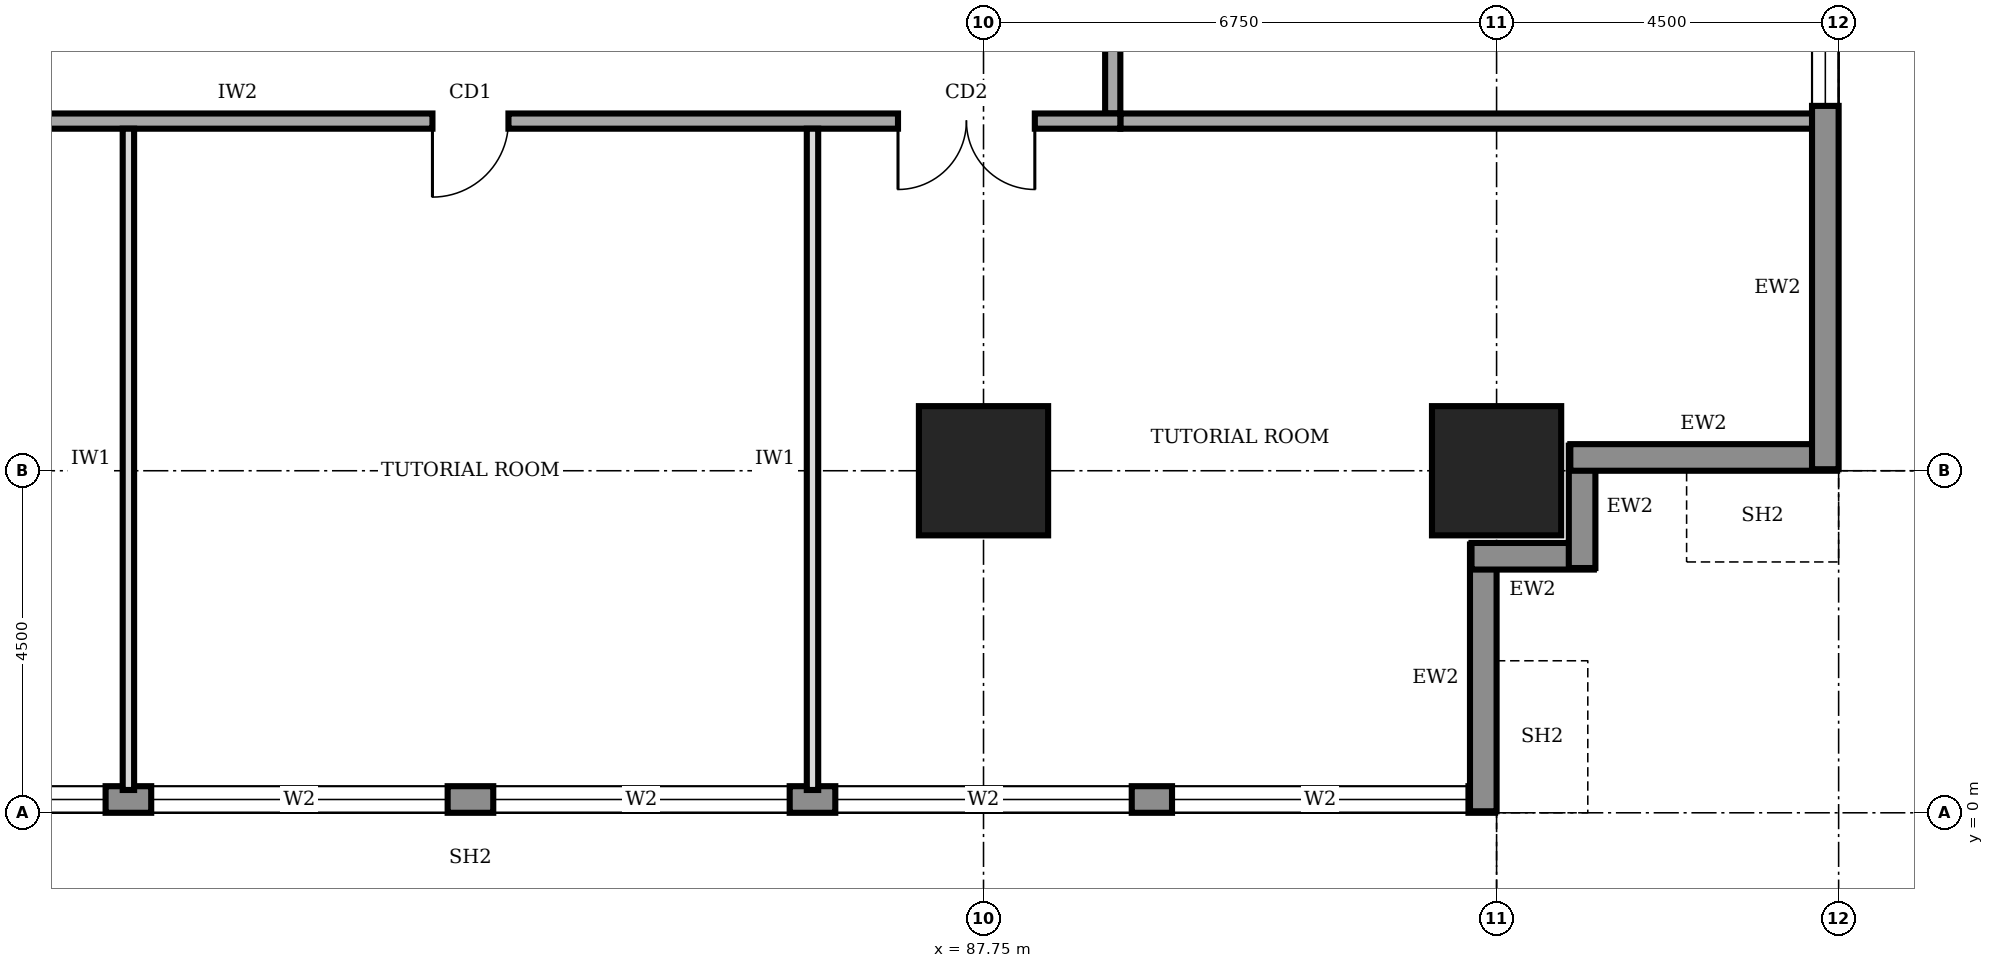
"""IFC4 building model, lengths in metres.
Left out: names, types, materials, properties, quantities, classifications, styles, units other than length and angle.
Written with IfcOpenShell. Run it as: python <this file> out.ifc"""

import sys

from ifc_helpers import new_model, si_unit, direction, frame, frame_2d, origin, origin_2d, place, context, subcontext, project, spatial, rectangle, extrude, element, fill, save


model = new_model("IFC4")
c1 = context("Model", 3, precision=1e-05, world=origin(), true_north=direction((0.0, 1.0)))
c2 = subcontext(c1, "Body", "Model", "MODEL_VIEW")
j1 = project(units=[si_unit("LENGTHUNIT", "METRE"), si_unit("PLANEANGLEUNIT", "RADIAN")], contexts=[c1])
p1 = place(None, origin())
s1 = spatial("IfcSite", under=j1, at=p1, CompositionType="ELEMENT")
p2 = place(p1, origin())
s2 = spatial("IfcBuilding", under=s1, at=p2, CompositionType="ELEMENT")
p3 = place(p2, frame((0.0, 0.0, 73.0)))
s3 = spatial("IfcBuildingStorey", under=s2, at=p3, CompositionType="ELEMENT", Elevation=73.0)
for number, where, z_axis, x_axis in (
    (1, (87.75, 4.5, 0.0), (0.0, 0.0, 1.0), (1.0, 0.0, 0.0)),
    (2, (94.5, 4.5, 0.0), (0.0, 0.0, 1.0), (1.0, 0.0, 0.0)),
):
    element("IfcColumn", number, at=place(p3, frame(where, z_axis=z_axis, x_axis=x_axis)), inside=s3, PredefinedType="COLUMN", context=c2, shape_type="SweptSolid", body=[
        extrude(rectangle(XDim=1.7, YDim=1.7, at=origin_2d()), origin(), (0.0, 0.0, 1.0), 4.0),
    ])
p4 = place(p3, frame((67.52, 0.175, 0.0), z_axis=(0.0, 0.0, 1.0), x_axis=(1.0, 0.0, 0.0)))
e3 = element("IfcWall", 3, at=p4, inside=s3, PredefinedType="STANDARD", context=c2, shape_type="SweptSolid", body=[
    extrude(rectangle(XDim=26.96, YDim=0.35, at=frame_2d((13.48, 0.0))), origin(), (0.0, 0.0, 1.0), 3.75),
])
p5 = place(p4, frame((4.78, 0.0, 0.6)))
e4 = element("IfcOpeningElement", 4, at=p5, cuts=e3, PredefinedType="OPENING", context=c2, shape_type="SweptSolid", body=[
    extrude(rectangle(XDim=3.9, YDim=2.6, at=frame_2d((1.95, 1.3))), frame((0.0, 0.185, 0.0), z_axis=(0.0, -1.0, 0.0), x_axis=(1.0, 0.0, 0.0)), (0.0, 0.0, 1.0), 0.37),
])
p6 = place(p4, frame((9.28, 0.0, 0.6)))
e5 = element("IfcOpeningElement", 5, at=p6, cuts=e3, PredefinedType="OPENING", context=c2, shape_type="SweptSolid", body=[
    extrude(rectangle(XDim=3.9, YDim=2.6, at=frame_2d((1.95, 1.3))), frame((0.0, 0.185, 0.0), z_axis=(0.0, -1.0, 0.0), x_axis=(1.0, 0.0, 0.0)), (0.0, 0.0, 1.0), 0.37),
])
p7 = place(p4, frame((13.78, 0.0, 0.6)))
e6 = element("IfcOpeningElement", 6, at=p7, cuts=e3, PredefinedType="OPENING", context=c2, shape_type="SweptSolid", body=[
    extrude(rectangle(XDim=3.9, YDim=2.6, at=frame_2d((1.95, 1.3))), frame((0.0, 0.185, 0.0), z_axis=(0.0, -1.0, 0.0), x_axis=(1.0, 0.0, 0.0)), (0.0, 0.0, 1.0), 0.37),
])
p8 = place(p4, frame((18.28, 0.0, 0.6)))
e7 = element("IfcOpeningElement", 7, at=p8, cuts=e3, PredefinedType="OPENING", context=c2, shape_type="SweptSolid", body=[
    extrude(rectangle(XDim=3.9, YDim=2.6, at=frame_2d((1.95, 1.3))), frame((0.0, 0.185, 0.0), z_axis=(0.0, -1.0, 0.0), x_axis=(1.0, 0.0, 0.0)), (0.0, 0.0, 1.0), 0.37),
])
p9 = place(p4, frame((22.71, 0.0, 0.6)))
e8 = element("IfcOpeningElement", 8, at=p9, cuts=e3, PredefinedType="OPENING", context=c2, shape_type="SweptSolid", body=[
    extrude(rectangle(XDim=3.9, YDim=2.6, at=frame_2d((1.95, 1.3))), frame((0.0, 0.185, 0.0), z_axis=(0.0, -1.0, 0.0), x_axis=(1.0, 0.0, 0.0)), (0.0, 0.0, 1.0), 0.37),
])
p10 = place(p3, frame((94.325, 0.02, 0.0), z_axis=(0.0, 0.0, 1.0), x_axis=(0.0, 1.0, 0.0)))
e9 = element("IfcWall", 9, at=p10, inside=s3, PredefinedType="STANDARD", context=c2, shape_type="SweptSolid", body=[
    extrude(rectangle(XDim=3.51, YDim=0.35, at=frame_2d((1.755, 0.0))), origin(), (0.0, 0.0, 1.0), 2.75),
])
for number, where, z_axis, x_axis in (
    (10, (94.17, 3.375, 0.0), (0.0, 0.0, 1.0), (1.0, 0.0, 0.0)),
    (11, (95.625, 3.22, 0.0), (0.0, 0.0, 1.0), (0.0, 1.0, 0.0)),
):
    element("IfcWall", number, at=place(p3, frame(where, z_axis=z_axis, x_axis=x_axis)), inside=s3, PredefinedType="STANDARD", context=c2, shape_type="SweptSolid", body=[
        extrude(rectangle(XDim=1.61, YDim=0.35, at=frame_2d((0.805, 0.0))), origin(), (0.0, 0.0, 1.0), 3.75),
    ])
p11 = place(p3, frame((95.47, 4.675, 0.0), z_axis=(0.0, 0.0, 1.0), x_axis=(1.0, 0.0, 0.0)))
e12 = element("IfcWall", 12, at=p11, inside=s3, PredefinedType="STANDARD", context=c2, shape_type="SweptSolid", body=[
    extrude(rectangle(XDim=3.51, YDim=0.35, at=frame_2d((1.755, 0.0))), origin(), (0.0, 0.0, 1.0), 2.75),
])
p12 = place(p3, frame((98.825, 4.52, 0.0), z_axis=(0.0, 0.0, 1.0), x_axis=(0.0, 1.0, 0.0)))
e13 = element("IfcWall", 13, at=p12, inside=s3, PredefinedType="STANDARD", context=c2, shape_type="SweptSolid", body=[
    extrude(rectangle(XDim=31.46, YDim=0.35, at=frame_2d((15.73, 0.0))), origin(), (0.0, 0.0, 1.0), 3.75),
])
p13 = place(p12, frame((4.78, 0.0, 0.6)))
e14 = element("IfcOpeningElement", 14, at=p13, cuts=e13, PredefinedType="OPENING", context=c2, shape_type="SweptSolid", body=[
    extrude(rectangle(XDim=3.9, YDim=2.6, at=frame_2d((1.95, 1.3))), frame((0.0, 0.185, 0.0), z_axis=(0.0, -1.0, 0.0), x_axis=(1.0, 0.0, 0.0)), (0.0, 0.0, 1.0), 0.37),
])
p14 = place(p12, frame((9.28, 0.0, 0.6)))
e15 = element("IfcOpeningElement", 15, at=p14, cuts=e13, PredefinedType="OPENING", context=c2, shape_type="SweptSolid", body=[
    extrude(rectangle(XDim=3.9, YDim=2.6, at=frame_2d((1.95, 1.3))), frame((0.0, 0.185, 0.0), z_axis=(0.0, -1.0, 0.0), x_axis=(1.0, 0.0, 0.0)), (0.0, 0.0, 1.0), 0.37),
])
p15 = place(p12, frame((13.78, 0.0, 0.6)))
e16 = element("IfcOpeningElement", 16, at=p15, cuts=e13, PredefinedType="OPENING", context=c2, shape_type="SweptSolid", body=[
    extrude(rectangle(XDim=3.9, YDim=2.6, at=frame_2d((1.95, 1.3))), frame((0.0, 0.185, 0.0), z_axis=(0.0, -1.0, 0.0), x_axis=(1.0, 0.0, 0.0)), (0.0, 0.0, 1.0), 0.37),
])
p16 = place(p12, frame((18.28, 0.0, 0.6)))
e17 = element("IfcOpeningElement", 17, at=p16, cuts=e13, PredefinedType="OPENING", context=c2, shape_type="SweptSolid", body=[
    extrude(rectangle(XDim=3.9, YDim=2.6, at=frame_2d((1.95, 1.3))), frame((0.0, 0.185, 0.0), z_axis=(0.0, -1.0, 0.0), x_axis=(1.0, 0.0, 0.0)), (0.0, 0.0, 1.0), 0.37),
])
p17 = place(p12, frame((22.78, 0.0, 0.6)))
e18 = element("IfcOpeningElement", 18, at=p17, cuts=e13, PredefinedType="OPENING", context=c2, shape_type="SweptSolid", body=[
    extrude(rectangle(XDim=3.9, YDim=2.6, at=frame_2d((1.95, 1.3))), frame((0.0, 0.185, 0.0), z_axis=(0.0, -1.0, 0.0), x_axis=(1.0, 0.0, 0.0)), (0.0, 0.0, 1.0), 0.37),
])
p18 = place(p12, frame((27.21, 0.0, 0.6)))
e19 = element("IfcOpeningElement", 19, at=p18, cuts=e13, PredefinedType="OPENING", context=c2, shape_type="SweptSolid", body=[
    extrude(rectangle(XDim=3.9, YDim=2.6, at=frame_2d((1.95, 1.3))), frame((0.0, 0.185, 0.0), z_axis=(0.0, -1.0, 0.0), x_axis=(1.0, 0.0, 0.0)), (0.0, 0.0, 1.0), 0.37),
])
p19 = place(p3, frame((72.65, 9.1, 0.0), z_axis=(0.0, 0.0, 1.0), x_axis=(1.0, 0.0, 0.0)))
e20 = element("IfcWall", 20, at=p19, inside=s3, PredefinedType="SOLIDWALL", context=c2, shape_type="SweptSolid", body=[
    extrude(rectangle(XDim=16.9, YDim=0.2, at=frame_2d((8.45, 0.0))), origin(), (0.0, 0.0, 1.0), 3.75),
])
p20 = place(p19, frame((0.925, 0.0, 0.0)))
e21 = element("IfcOpeningElement", 21, at=p20, cuts=e20, PredefinedType="OPENING", context=c2, shape_type="SweptSolid", body=[
    extrude(rectangle(XDim=1.8, YDim=2.1, at=frame_2d((0.9, 1.05))), frame((0.0, 0.11, 0.0), z_axis=(0.0, -1.0, 0.0), x_axis=(1.0, 0.0, 0.0)), (0.0, 0.0, 1.0), 0.22),
])
p21 = place(p19, frame((7.85, 0.0, 0.0)))
e22 = element("IfcOpeningElement", 22, at=p21, cuts=e20, PredefinedType="OPENING", context=c2, shape_type="SweptSolid", body=[
    extrude(rectangle(XDim=1.0, YDim=2.1, at=frame_2d((0.5, 1.05))), frame((0.0, 0.11, 0.0), z_axis=(0.0, -1.0, 0.0), x_axis=(1.0, 0.0, 0.0)), (0.0, 0.0, 1.0), 0.22),
])
p22 = place(p19, frame((13.975, 0.0, 0.0)))
e23 = element("IfcOpeningElement", 23, at=p22, cuts=e20, PredefinedType="OPENING", context=c2, shape_type="SweptSolid", body=[
    extrude(rectangle(XDim=1.8, YDim=2.1, at=frame_2d((0.9, 1.05))), frame((0.0, 0.11, 0.0), z_axis=(0.0, -1.0, 0.0), x_axis=(1.0, 0.0, 0.0)), (0.0, 0.0, 1.0), 0.22),
])
p23 = place(p3, frame((89.45, 9.2, 0.0), z_axis=(0.0, 0.0, 1.0), x_axis=(0.0, 1.0, 0.0)))
e24 = element("IfcWall", 24, at=p23, inside=s3, PredefinedType="SOLIDWALL", context=c2, shape_type="SweptSolid", body=[
    extrude(rectangle(XDim=22.3, YDim=0.2, at=frame_2d((11.15, 0.0))), origin(), (0.0, 0.0, 1.0), 3.75),
])
p24 = place(p23, frame((1.55, 0.0, 0.0)))
e25 = element("IfcOpeningElement", 25, at=p24, cuts=e24, PredefinedType="OPENING", context=c2, shape_type="SweptSolid", body=[
    extrude(rectangle(XDim=1.0, YDim=2.1, at=frame_2d((0.5, 1.05))), frame((0.0, 0.11, 0.0), z_axis=(0.0, -1.0, 0.0), x_axis=(1.0, 0.0, 0.0)), (0.0, 0.0, 1.0), 0.22),
])
p25 = place(p23, frame((5.55, 0.0, 0.0)))
e26 = element("IfcOpeningElement", 26, at=p25, cuts=e24, PredefinedType="OPENING", context=c2, shape_type="SweptSolid", body=[
    extrude(rectangle(XDim=0.9, YDim=2.1, at=frame_2d((0.45, 1.05))), frame((0.0, 0.11, 0.0), z_axis=(0.0, -1.0, 0.0), x_axis=(1.0, 0.0, 0.0)), (0.0, 0.0, 1.0), 0.22),
])
p26 = place(p23, frame((10.35, 0.0, 0.0)))
e27 = element("IfcOpeningElement", 27, at=p26, cuts=e24, PredefinedType="OPENING", context=c2, shape_type="SweptSolid", body=[
    extrude(rectangle(XDim=0.9, YDim=2.1, at=frame_2d((0.45, 1.05))), frame((0.0, 0.11, 0.0), z_axis=(0.0, -1.0, 0.0), x_axis=(1.0, 0.0, 0.0)), (0.0, 0.0, 1.0), 0.22),
])
p27 = place(p23, frame((13.4, 0.0, 0.0)))
e28 = element("IfcOpeningElement", 28, at=p27, cuts=e24, PredefinedType="OPENING", context=c2, shape_type="SweptSolid", body=[
    extrude(rectangle(XDim=0.9, YDim=2.1, at=frame_2d((0.45, 1.05))), frame((0.0, 0.11, 0.0), z_axis=(0.0, -1.0, 0.0), x_axis=(1.0, 0.0, 0.0)), (0.0, 0.0, 1.0), 0.22),
])
p28 = place(p23, frame((16.3, 0.0, 0.0)))
e29 = element("IfcOpeningElement", 29, at=p28, cuts=e24, PredefinedType="OPENING", context=c2, shape_type="SweptSolid", body=[
    extrude(rectangle(XDim=1.0, YDim=2.1, at=frame_2d((0.5, 1.05))), frame((0.0, 0.11, 0.0), z_axis=(0.0, -1.0, 0.0), x_axis=(1.0, 0.0, 0.0)), (0.0, 0.0, 1.0), 0.22),
])
p29 = place(p23, frame((8.2, 0.0, 0.0)))
e30 = element("IfcOpeningElement", 30, at=p29, cuts=e24, PredefinedType="OPENING", context=c2, shape_type="SweptSolid", body=[
    extrude(rectangle(XDim=1.0, YDim=2.1, at=frame_2d((0.5, 1.05))), frame((0.0, 0.11, 0.0), z_axis=(0.0, -1.0, 0.0), x_axis=(1.0, 0.0, 0.0)), (0.0, 0.0, 1.0), 0.22),
])
p30 = place(p23, frame((19.55, 0.0, 0.0)))
e31 = element("IfcOpeningElement", 31, at=p30, cuts=e24, PredefinedType="OPENING", context=c2, shape_type="SweptSolid", body=[
    extrude(rectangle(XDim=1.0, YDim=2.1, at=frame_2d((0.5, 1.05))), frame((0.0, 0.11, 0.0), z_axis=(0.0, -1.0, 0.0), x_axis=(1.0, 0.0, 0.0)), (0.0, 0.0, 1.0), 0.22),
])
p31 = place(p3, frame((89.55, 9.1, 0.0), z_axis=(0.0, 0.0, 1.0), x_axis=(1.0, 0.0, 0.0)))
e32 = element("IfcWall", 32, at=p31, inside=s3, PredefinedType="SOLIDWALL", context=c2, shape_type="SweptSolid", body=[
    extrude(rectangle(XDim=9.15, YDim=0.2, at=frame_2d((4.575, 0.0))), origin(), (0.0, 0.0, 1.0), 3.75),
])
for number, where, z_axis, x_axis in (
    (33, (76.5, 0.3, 0.0), (0.0, 0.0, 1.0), (0.0, 1.0, 0.0)),
    (34, (85.5, 0.3, 0.0), (0.0, 0.0, 1.0), (0.0, 1.0, 0.0)),
):
    element("IfcWall", number, at=place(p3, frame(where, z_axis=z_axis, x_axis=x_axis)), inside=s3, PredefinedType="PARTITIONING", context=c2, shape_type="SweptSolid", body=[
        extrude(rectangle(XDim=8.7, YDim=0.15, at=frame_2d((4.35, 0.0))), origin(), (0.0, 0.0, 1.0), 3.75),
    ])
p32 = place(p5, origin())
e35 = element("IfcWindow", 35, at=p32, inside=s3, PartitioningType="SINGLE_PANEL", PredefinedType="WINDOW", context=c2, shape_type="SweptSolid", body=[
    extrude(rectangle(XDim=3.9, YDim=2.6, at=frame_2d((1.95, 1.3))), frame((0.0, 0.03, 0.0), z_axis=(0.0, -1.0, 0.0), x_axis=(1.0, 0.0, 0.0)), (0.0, 0.0, 1.0), 0.06),
])
fill(e4, e35)
p33 = place(p6, origin())
e36 = element("IfcWindow", 36, at=p33, inside=s3, PartitioningType="SINGLE_PANEL", PredefinedType="WINDOW", context=c2, shape_type="SweptSolid", body=[
    extrude(rectangle(XDim=3.9, YDim=2.6, at=frame_2d((1.95, 1.3))), frame((0.0, 0.03, 0.0), z_axis=(0.0, -1.0, 0.0), x_axis=(1.0, 0.0, 0.0)), (0.0, 0.0, 1.0), 0.06),
])
fill(e5, e36)
p34 = place(p7, origin())
e37 = element("IfcWindow", 37, at=p34, inside=s3, PartitioningType="SINGLE_PANEL", PredefinedType="WINDOW", context=c2, shape_type="SweptSolid", body=[
    extrude(rectangle(XDim=3.9, YDim=2.6, at=frame_2d((1.95, 1.3))), frame((0.0, 0.03, 0.0), z_axis=(0.0, -1.0, 0.0), x_axis=(1.0, 0.0, 0.0)), (0.0, 0.0, 1.0), 0.06),
])
fill(e6, e37)
p35 = place(p8, origin())
e38 = element("IfcWindow", 38, at=p35, inside=s3, PartitioningType="SINGLE_PANEL", PredefinedType="WINDOW", context=c2, shape_type="SweptSolid", body=[
    extrude(rectangle(XDim=3.9, YDim=2.6, at=frame_2d((1.95, 1.3))), frame((0.0, 0.03, 0.0), z_axis=(0.0, -1.0, 0.0), x_axis=(1.0, 0.0, 0.0)), (0.0, 0.0, 1.0), 0.06),
])
fill(e7, e38)
p36 = place(p9, origin())
e39 = element("IfcWindow", 39, at=p36, inside=s3, PartitioningType="SINGLE_PANEL", PredefinedType="WINDOW", context=c2, shape_type="SweptSolid", body=[
    extrude(rectangle(XDim=3.9, YDim=2.6, at=frame_2d((1.95, 1.3))), frame((0.0, 0.03, 0.0), z_axis=(0.0, -1.0, 0.0), x_axis=(1.0, 0.0, 0.0)), (0.0, 0.0, 1.0), 0.06),
])
fill(e8, e39)
p37 = place(p13, origin())
e40 = element("IfcWindow", 40, at=p37, inside=s3, PartitioningType="SINGLE_PANEL", PredefinedType="WINDOW", context=c2, shape_type="SweptSolid", body=[
    extrude(rectangle(XDim=3.9, YDim=2.6, at=frame_2d((1.95, 1.3))), frame((0.0, 0.03, 0.0), z_axis=(0.0, -1.0, 0.0), x_axis=(1.0, 0.0, 0.0)), (0.0, 0.0, 1.0), 0.06),
])
fill(e14, e40)
p38 = place(p21, frame((1.0, 0.0, 0.0), z_axis=(0.0, 0.0, 1.0), x_axis=(-1.0, 0.0, 0.0)))
e41 = element("IfcDoor", 41, at=p38, inside=s3, OperationType="SINGLE_SWING_RIGHT", PredefinedType="DOOR", context=c2, shape_type="SweptSolid", body=[
    extrude(rectangle(XDim=1.0, YDim=2.1, at=frame_2d((0.5, 1.05))), frame((0.0, 0.025, 0.0), z_axis=(0.0, -1.0, 0.0), x_axis=(1.0, 0.0, 0.0)), (0.0, 0.0, 1.0), 0.05),
])
fill(e22, e41)
p39 = place(p22, frame((1.8, 0.0, 0.0), z_axis=(0.0, 0.0, 1.0), x_axis=(-1.0, 0.0, 0.0)))
e42 = element("IfcDoor", 42, at=p39, inside=s3, OperationType="DOUBLE_DOOR_SINGLE_SWING", PredefinedType="DOOR", context=c2, shape_type="SweptSolid", body=[
    extrude(rectangle(XDim=1.8, YDim=2.1, at=frame_2d((0.9, 1.05))), frame((0.0, 0.025, 0.0), z_axis=(0.0, -1.0, 0.0), x_axis=(1.0, 0.0, 0.0)), (0.0, 0.0, 1.0), 0.05),
])
fill(e23, e42)
save(model, sys.argv[1])
